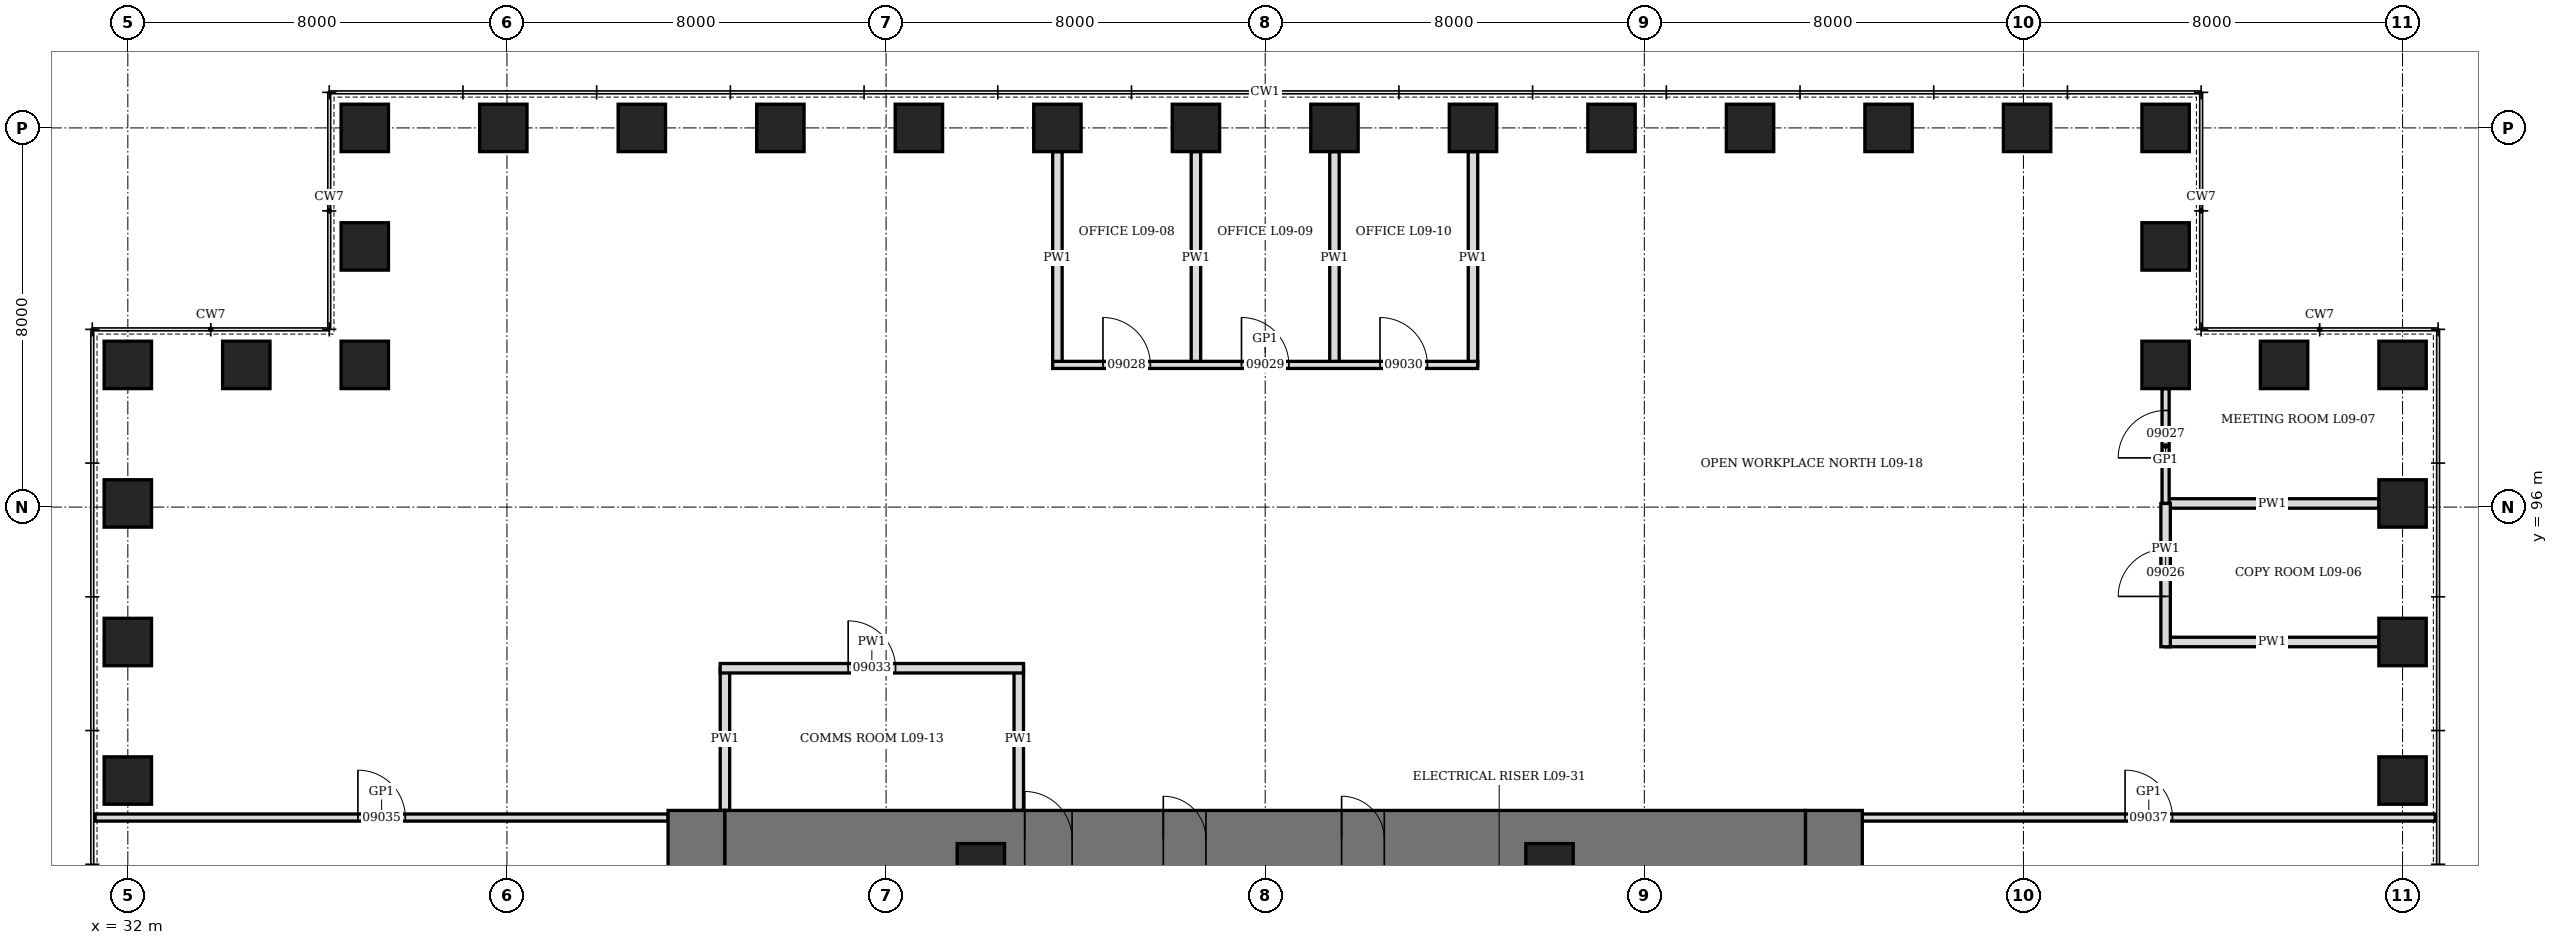
"""IFC4 building model, lengths in metres.
Left out: names, types, materials, properties, quantities, classifications, styles, units other than length and angle.
Written with IfcOpenShell. Run it as: python <this file> out.ifc"""

import sys

from ifc_helpers import new_model, si_unit, direction, frame, frame_2d, origin, origin_2d, place, context, subcontext, project, spatial, rectangle, hollow_rectangle, extrude, element, fill, save


model = new_model("IFC4")
c1 = context("Model", 3, precision=1e-05, world=origin(), true_north=direction((0.0, 1.0)))
c2 = subcontext(c1, "Body", "Model", "MODEL_VIEW")
j1 = project(units=[si_unit("LENGTHUNIT", "METRE"), si_unit("PLANEANGLEUNIT", "RADIAN")], contexts=[c1])
p1 = place(None, origin())
s1 = spatial("IfcSite", under=j1, at=p1, CompositionType="ELEMENT")
p2 = place(p1, origin())
s2 = spatial("IfcBuilding", under=s1, at=p2, CompositionType="ELEMENT")
p3 = place(p2, frame((0.0, 0.0, 47.5)))
s3 = spatial("IfcBuildingStorey", under=s2, at=p3, CompositionType="ELEMENT", Elevation=47.5)
for number, where, z_axis, x_axis in (
    (1, (80.0, 90.231, 0.0), (0.0, 0.0, 1.0), (0.0, 1.0, 0.0)),
    (2, (80.0, 93.154, 0.0), (0.0, 0.0, 1.0), (0.0, 1.0, 0.0)),
    (3, (80.0, 96.077, 0.0), (0.0, 0.0, 1.0), (0.0, 1.0, 0.0)),
    (4, (80.0, 99.0, 0.0), (0.0, 0.0, 1.0), (1.0, 0.0, 0.0)),
    (5, (77.5, 99.0, 0.0), (0.0, 0.0, 1.0), (1.0, 0.0, 0.0)),
    (6, (75.0, 99.0, 0.0), (0.0, 0.0, 1.0), (0.0, 1.0, 0.0)),
    (7, (75.0, 101.5, 0.0), (0.0, 0.0, 1.0), (0.0, 1.0, 0.0)),
    (8, (75.0, 104.0, 0.0), (0.0, 0.0, 1.0), (1.0, 0.0, 0.0)),
    (9, (72.077, 104.0, 0.0), (0.0, 0.0, 1.0), (1.0, 0.0, 0.0)),
    (10, (69.154, 104.0, 0.0), (0.0, 0.0, 1.0), (1.0, 0.0, 0.0)),
    (11, (66.231, 104.0, 0.0), (0.0, 0.0, 1.0), (1.0, 0.0, 0.0)),
    (12, (63.308, 104.0, 0.0), (0.0, 0.0, 1.0), (1.0, 0.0, 0.0)),
    (13, (60.385, 104.0, 0.0), (0.0, 0.0, 1.0), (1.0, 0.0, 0.0)),
    (14, (57.461, 104.0, 0.0), (0.0, 0.0, 1.0), (1.0, 0.0, 0.0)),
    (15, (54.539, 104.0, 0.0), (0.0, 0.0, 1.0), (1.0, 0.0, 0.0)),
    (16, (51.615, 104.0, 0.0), (0.0, 0.0, 1.0), (1.0, 0.0, 0.0)),
    (17, (48.692, 104.0, 0.0), (0.0, 0.0, 1.0), (1.0, 0.0, 0.0)),
    (18, (45.769, 104.0, 0.0), (0.0, 0.0, 1.0), (1.0, 0.0, 0.0)),
    (19, (42.846, 104.0, 0.0), (0.0, 0.0, 1.0), (1.0, 0.0, 0.0)),
    (20, (39.923, 104.0, 0.0), (0.0, 0.0, 1.0), (1.0, 0.0, 0.0)),
    (21, (37.0, 104.0, 0.0), (0.0, 0.0, 1.0), (0.0, 1.0, 0.0)),
    (22, (37.0, 101.5, 0.0), (0.0, 0.0, 1.0), (0.0, 1.0, 0.0)),
    (23, (37.0, 99.0, 0.0), (0.0, 0.0, 1.0), (1.0, 0.0, 0.0)),
    (24, (34.5, 99.0, 0.0), (0.0, 0.0, 1.0), (1.0, 0.0, 0.0)),
    (25, (32.0, 99.0, 0.0), (0.0, 0.0, 1.0), (0.0, 1.0, 0.0)),
    (26, (32.0, 96.077, 0.0), (0.0, 0.0, 1.0), (0.0, 1.0, 0.0)),
    (27, (32.0, 93.154, 0.0), (0.0, 0.0, 1.0), (0.0, 1.0, 0.0)),
    (28, (32.0, 90.231, 0.0), (0.0, 0.0, 1.0), (0.0, 1.0, 0.0)),
):
    element("IfcColumn", number, at=place(p3, frame(where, z_axis=z_axis, x_axis=x_axis)), inside=s3, PredefinedType="COLUMN", context=c2, shape_type="SweptSolid", body=[
        extrude(hollow_rectangle(XDim=1.0, YDim=1.0, WallThickness=0.25, at=origin_2d()), origin(), (0.0, 0.0, 1.0), 4.2),
    ])
p4 = place(p3, frame((44.0, 70.4, 0.0), z_axis=(0.0, 0.0, 1.0), x_axis=(0.0, 1.0, 0.0)))
e29 = element("IfcWall", 29, at=p4, inside=s3, PredefinedType="SHEAR", context=c2, shape_type="SweptSolid", body=[
    extrude(rectangle(XDim=19.2, YDim=1.2, at=frame_2d((9.6, 0.0))), origin(), (0.0, 0.0, 1.0), 4.2),
])
p5 = place(p4, frame((8.6, 0.0, 0.0)))
e30 = element("IfcOpeningElement", 30, at=p5, cuts=e29, PredefinedType="OPENING", context=c2, shape_type="SweptSolid", body=[
    extrude(rectangle(XDim=2.0, YDim=2.4, at=frame_2d((1.0, 1.2))), frame((0.0, 0.61, 0.0), z_axis=(0.0, -1.0, 0.0), x_axis=(1.0, 0.0, 0.0)), (0.0, 0.0, 1.0), 1.22),
])
p6 = place(p3, frame((68.0, 70.4, 0.0), z_axis=(0.0, 0.0, 1.0), x_axis=(0.0, 1.0, 0.0)))
e31 = element("IfcWall", 31, at=p6, inside=s3, PredefinedType="SHEAR", context=c2, shape_type="SweptSolid", body=[
    extrude(rectangle(XDim=19.2, YDim=1.2, at=frame_2d((9.6, 0.0))), origin(), (0.0, 0.0, 1.0), 4.2),
])
p7 = place(p6, frame((8.6, 0.0, 0.0)))
e32 = element("IfcOpeningElement", 32, at=p7, cuts=e31, PredefinedType="OPENING", context=c2, shape_type="SweptSolid", body=[
    extrude(rectangle(XDim=2.0, YDim=2.4, at=frame_2d((1.0, 1.2))), frame((0.0, 0.61, 0.0), z_axis=(0.0, -1.0, 0.0), x_axis=(1.0, 0.0, 0.0)), (0.0, 0.0, 1.0), 1.22),
])
p8 = place(p3, frame((44.6, 89.0, 0.0), z_axis=(0.0, 0.0, 1.0), x_axis=(1.0, 0.0, 0.0)))
e33 = element("IfcWall", 33, at=p8, inside=s3, PredefinedType="SHEAR", context=c2, shape_type="SweptSolid", body=[
    extrude(rectangle(XDim=22.8, YDim=1.2, at=frame_2d((11.4, 0.0))), origin(), (0.0, 0.0, 1.0), 4.2),
])
p9 = place(p8, frame((6.325, 0.0, 0.0)))
e34 = element("IfcOpeningElement", 34, at=p9, cuts=e33, PredefinedType="OPENING", context=c2, shape_type="SweptSolid", body=[
    extrude(rectangle(XDim=1.0, YDim=2.1, at=frame_2d((0.5, 1.05))), frame((0.0, 0.61, 0.0), z_axis=(0.0, -1.0, 0.0), x_axis=(1.0, 0.0, 0.0)), (0.0, 0.0, 1.0), 1.22),
])
p10 = place(p8, frame((9.25, 0.0, 0.0)))
e35 = element("IfcOpeningElement", 35, at=p10, cuts=e33, PredefinedType="OPENING", context=c2, shape_type="SweptSolid", body=[
    extrude(rectangle(XDim=0.9, YDim=2.1, at=frame_2d((0.45, 1.05))), frame((0.0, 0.61, 0.0), z_axis=(0.0, -1.0, 0.0), x_axis=(1.0, 0.0, 0.0)), (0.0, 0.0, 1.0), 1.22),
])
p11 = place(p8, frame((13.012, 0.0, 0.0)))
e36 = element("IfcOpeningElement", 36, at=p11, cuts=e33, PredefinedType="OPENING", context=c2, shape_type="SweptSolid", body=[
    extrude(rectangle(XDim=0.9, YDim=2.1, at=frame_2d((0.45, 1.05))), frame((0.0, 0.61, 0.0), z_axis=(0.0, -1.0, 0.0), x_axis=(1.0, 0.0, 0.0)), (0.0, 0.0, 1.0), 1.22),
])
for number, where, z_axis, x_axis in (
    (37, (50.0, 88.4, 0.0), (0.0, 0.0, 1.0), (1.0, 0.0, 0.0)),
    (38, (62.0, 88.4, 0.0), (0.0, 0.0, 1.0), (1.0, 0.0, 0.0)),
):
    element("IfcColumn", number, at=place(p3, frame(where, z_axis=z_axis, x_axis=x_axis)), inside=s3, PredefinedType="COLUMN", context=c2, shape_type="SweptSolid", body=[
        extrude(hollow_rectangle(XDim=1.0, YDim=1.0, WallThickness=0.15, at=origin_2d()), origin(), (0.0, 0.0, 1.0), 4.2),
    ])
for number, where, z_axis, x_axis in (
    (39, (75.0, 93.154, 0.0), (0.0, 0.0, 1.0), (1.0, 0.0, 0.0)),
    (40, (75.0, 96.077, 0.0), (0.0, 0.0, 1.0), (1.0, 0.0, 0.0)),
):
    element("IfcWall", number, at=place(p3, frame(where, z_axis=z_axis, x_axis=x_axis)), inside=s3, PredefinedType="PARTITIONING", context=c2, shape_type="SweptSolid", body=[
        extrude(rectangle(XDim=4.5, YDim=0.2, at=frame_2d((2.25, 0.0))), origin(), (0.0, 0.0, 1.0), 3.428),
    ])
for number, where, z_axis, x_axis in (
    (41, (51.615, 99.0, 0.0), (0.0, 0.0, 1.0), (0.0, 1.0, 0.0)),
    (42, (54.539, 99.0, 0.0), (0.0, 0.0, 1.0), (0.0, 1.0, 0.0)),
    (43, (57.461, 99.0, 0.0), (0.0, 0.0, 1.0), (0.0, 1.0, 0.0)),
    (44, (60.385, 99.0, 0.0), (0.0, 0.0, 1.0), (0.0, 1.0, 0.0)),
):
    element("IfcWall", number, at=place(p3, frame(where, z_axis=z_axis, x_axis=x_axis)), inside=s3, PredefinedType="PARTITIONING", context=c2, shape_type="SweptSolid", body=[
        extrude(rectangle(XDim=4.5, YDim=0.2, at=frame_2d((2.25, 0.0))), origin(), (0.0, 0.0, 1.0), 3.278),
    ])
for number, where, z_axis, x_axis in (
    (45, (44.6, 89.6, 0.0), (0.0, 0.0, 1.0), (0.0, 1.0, 0.0)),
    (46, (50.8, 89.6, 0.0), (0.0, 0.0, 1.0), (0.0, 1.0, 0.0)),
):
    element("IfcWall", number, at=place(p3, frame(where, z_axis=z_axis, x_axis=x_axis)), inside=s3, PredefinedType="PARTITIONING", context=c2, shape_type="SweptSolid", body=[
        extrude(rectangle(XDim=3.0, YDim=0.2, at=frame_2d((1.5, 0.0))), origin(), (0.0, 0.0, 1.0), 4.04),
    ])
p12 = place(p3, frame((31.31, 89.45, 0.0), z_axis=(0.0, 0.0, 1.0), x_axis=(1.0, 0.0, 0.0)))
e47 = element("IfcWall", 47, at=p12, inside=s3, PredefinedType="PARTITIONING", context=c2, shape_type="SweptSolid", body=[
    extrude(rectangle(XDim=12.09, YDim=0.15, at=frame_2d((6.045, 0.0))), origin(), (0.0, 0.0, 1.0), 4.04),
])
p13 = place(p12, frame((5.545, 0.0, 0.0)))
e48 = element("IfcOpeningElement", 48, at=p13, cuts=e47, PredefinedType="OPENING", context=c2, shape_type="SweptSolid", body=[
    extrude(rectangle(XDim=1.0, YDim=2.4, at=frame_2d((0.5, 1.2))), frame((0.0, 0.085, 0.0), z_axis=(0.0, -1.0, 0.0), x_axis=(1.0, 0.0, 0.0)), (0.0, 0.0, 1.0), 0.17),
])
p14 = place(p3, frame((68.6, 89.45, 0.0), z_axis=(0.0, 0.0, 1.0), x_axis=(1.0, 0.0, 0.0)))
e49 = element("IfcWall", 49, at=p14, inside=s3, PredefinedType="PARTITIONING", context=c2, shape_type="SweptSolid", body=[
    extrude(rectangle(XDim=12.09, YDim=0.15, at=frame_2d((6.045, 0.0))), origin(), (0.0, 0.0, 1.0), 4.04),
])
p15 = place(p14, frame((5.545, 0.0, 0.0)))
e50 = element("IfcOpeningElement", 50, at=p15, cuts=e49, PredefinedType="OPENING", context=c2, shape_type="SweptSolid", body=[
    extrude(rectangle(XDim=1.0, YDim=2.4, at=frame_2d((0.5, 1.2))), frame((0.0, 0.085, 0.0), z_axis=(0.0, -1.0, 0.0), x_axis=(1.0, 0.0, 0.0)), (0.0, 0.0, 1.0), 0.17),
])
p16 = place(p3, frame((44.5, 92.6, 0.0), z_axis=(0.0, 0.0, 1.0), x_axis=(1.0, 0.0, 0.0)))
e51 = element("IfcWall", 51, at=p16, inside=s3, PredefinedType="PARTITIONING", context=c2, shape_type="SweptSolid", body=[
    extrude(rectangle(XDim=6.4, YDim=0.2, at=frame_2d((3.2, 0.0))), origin(), (0.0, 0.0, 1.0), 4.04),
])
p17 = place(p16, frame((2.7, 0.0, 0.0)))
e52 = element("IfcOpeningElement", 52, at=p17, cuts=e51, PredefinedType="OPENING", context=c2, shape_type="SweptSolid", body=[
    extrude(rectangle(XDim=1.0, YDim=2.1, at=frame_2d((0.5, 1.05))), frame((0.0, 0.11, 0.0), z_axis=(0.0, -1.0, 0.0), x_axis=(1.0, 0.0, 0.0)), (0.0, 0.0, 1.0), 0.22),
])
p18 = place(p3, frame((51.515, 99.0, 0.0), z_axis=(0.0, 0.0, 1.0), x_axis=(1.0, 0.0, 0.0)))
e53 = element("IfcWall", 53, at=p18, inside=s3, PredefinedType="PARTITIONING", context=c2, shape_type="SweptSolid", body=[
    extrude(rectangle(XDim=8.969, YDim=0.15, at=frame_2d((4.485, 0.0))), origin(), (0.0, 0.0, 1.0), 4.04),
])
p19 = place(p18, frame((1.062, 0.0, 0.0)))
e54 = element("IfcOpeningElement", 54, at=p19, cuts=e53, PredefinedType="OPENING", context=c2, shape_type="SweptSolid", body=[
    extrude(rectangle(XDim=1.0, YDim=2.1, at=frame_2d((0.5, 1.05))), frame((0.0, 0.085, 0.0), z_axis=(0.0, -1.0, 0.0), x_axis=(1.0, 0.0, 0.0)), (0.0, 0.0, 1.0), 0.17),
])
p20 = place(p18, frame((3.985, 0.0, 0.0)))
e55 = element("IfcOpeningElement", 55, at=p20, cuts=e53, PredefinedType="OPENING", context=c2, shape_type="SweptSolid", body=[
    extrude(rectangle(XDim=1.0, YDim=2.1, at=frame_2d((0.5, 1.05))), frame((0.0, 0.085, 0.0), z_axis=(0.0, -1.0, 0.0), x_axis=(1.0, 0.0, 0.0)), (0.0, 0.0, 1.0), 0.17),
])
p21 = place(p18, frame((6.908, 0.0, 0.0)))
e56 = element("IfcOpeningElement", 56, at=p21, cuts=e53, PredefinedType="OPENING", context=c2, shape_type="SweptSolid", body=[
    extrude(rectangle(XDim=1.0, YDim=2.1, at=frame_2d((0.5, 1.05))), frame((0.0, 0.085, 0.0), z_axis=(0.0, -1.0, 0.0), x_axis=(1.0, 0.0, 0.0)), (0.0, 0.0, 1.0), 0.17),
])
p22 = place(p3, frame((75.0, 96.077, 0.0), z_axis=(0.0, 0.0, 1.0), x_axis=(0.0, 1.0, 0.0)))
e57 = element("IfcWall", 57, at=p22, inside=s3, PredefinedType="PARTITIONING", context=c2, shape_type="SweptSolid", body=[
    extrude(rectangle(XDim=2.423, YDim=0.15, at=frame_2d((1.211, 0.0))), origin(), (0.0, 0.0, 1.0), 4.04),
])
p23 = place(p22, frame((0.961, 0.0, 0.0)))
e58 = element("IfcOpeningElement", 58, at=p23, cuts=e57, PredefinedType="OPENING", context=c2, shape_type="SweptSolid", body=[
    extrude(rectangle(XDim=1.0, YDim=2.4, at=frame_2d((0.5, 1.2))), frame((0.0, 0.085, 0.0), z_axis=(0.0, -1.0, 0.0), x_axis=(1.0, 0.0, 0.0)), (0.0, 0.0, 1.0), 0.17),
])
p24 = place(p3, frame((75.0, 93.054, 0.0), z_axis=(0.0, 0.0, 1.0), x_axis=(0.0, 1.0, 0.0)))
e59 = element("IfcWall", 59, at=p24, inside=s3, PredefinedType="PARTITIONING", context=c2, shape_type="SweptSolid", body=[
    extrude(rectangle(XDim=3.023, YDim=0.2, at=frame_2d((1.511, 0.0))), origin(), (0.0, 0.0, 1.0), 4.04),
])
p25 = place(p24, frame((1.062, 0.0, 0.0)))
e60 = element("IfcOpeningElement", 60, at=p25, cuts=e59, PredefinedType="OPENING", context=c2, shape_type="SweptSolid", body=[
    extrude(rectangle(XDim=1.0, YDim=2.1, at=frame_2d((0.5, 1.05))), frame((0.0, 0.11, 0.0), z_axis=(0.0, -1.0, 0.0), x_axis=(1.0, 0.0, 0.0)), (0.0, 0.0, 1.0), 0.22),
])
p26 = place(p9, origin())
e61 = element("IfcDoor", 61, at=p26, inside=s3, OperationType="SINGLE_SWING_LEFT", PredefinedType="DOOR", context=c2, shape_type="SweptSolid", body=[
    extrude(rectangle(XDim=1.0, YDim=2.1, at=frame_2d((0.5, 1.05))), frame((0.0, 0.35, 0.0), z_axis=(0.0, -1.0, 0.0), x_axis=(1.0, 0.0, 0.0)), (0.0, 0.0, 1.0), 0.7),
])
fill(e34, e61)
p27 = place(p10, origin())
e62 = element("IfcDoor", 62, at=p27, inside=s3, OperationType="SINGLE_SWING_LEFT", PredefinedType="DOOR", context=c2, shape_type="SweptSolid", body=[
    extrude(rectangle(XDim=0.9, YDim=2.1, at=frame_2d((0.45, 1.05))), frame((0.0, 0.35, 0.0), z_axis=(0.0, -1.0, 0.0), x_axis=(1.0, 0.0, 0.0)), (0.0, 0.0, 1.0), 0.7),
])
fill(e35, e62)
p28 = place(p11, origin())
e63 = element("IfcDoor", 63, at=p28, inside=s3, OperationType="SINGLE_SWING_LEFT", PredefinedType="DOOR", context=c2, shape_type="SweptSolid", body=[
    extrude(rectangle(XDim=0.9, YDim=2.1, at=frame_2d((0.45, 1.05))), frame((0.0, 0.35, 0.0), z_axis=(0.0, -1.0, 0.0), x_axis=(1.0, 0.0, 0.0)), (0.0, 0.0, 1.0), 0.7),
])
fill(e36, e63)
p29 = place(p25, origin())
e64 = element("IfcDoor", 64, at=p29, inside=s3, OperationType="SINGLE_SWING_LEFT", PredefinedType="DOOR", context=c2, shape_type="SweptSolid", body=[
    extrude(rectangle(XDim=1.0, YDim=2.1, at=frame_2d((0.5, 1.05))), frame((0.0, 0.1, 0.0), z_axis=(0.0, -1.0, 0.0), x_axis=(1.0, 0.0, 0.0)), (0.0, 0.0, 1.0), 0.199),
])
fill(e60, e64)
p30 = place(p23, origin())
e65 = element("IfcDoor", 65, at=p30, inside=s3, OperationType="SINGLE_SWING_RIGHT", PredefinedType="DOOR", context=c2, shape_type="SweptSolid", body=[
    extrude(rectangle(XDim=1.0, YDim=2.4, at=frame_2d((0.5, 1.2))), frame((0.0, 0.075, 0.0), z_axis=(0.0, -1.0, 0.0), x_axis=(1.0, 0.0, 0.0)), (0.0, 0.0, 1.0), 0.149),
])
fill(e58, e65)
p31 = place(p19, origin())
e66 = element("IfcDoor", 66, at=p31, inside=s3, OperationType="SINGLE_SWING_LEFT", PredefinedType="DOOR", context=c2, shape_type="SweptSolid", body=[
    extrude(rectangle(XDim=1.0, YDim=2.1, at=frame_2d((0.5, 1.05))), frame((0.0, 0.075, 0.0), z_axis=(0.0, -1.0, 0.0), x_axis=(1.0, 0.0, 0.0)), (0.0, 0.0, 1.0), 0.149),
])
fill(e54, e66)
p32 = place(p20, origin())
e67 = element("IfcDoor", 67, at=p32, inside=s3, OperationType="SINGLE_SWING_LEFT", PredefinedType="DOOR", context=c2, shape_type="SweptSolid", body=[
    extrude(rectangle(XDim=1.0, YDim=2.1, at=frame_2d((0.5, 1.05))), frame((0.0, 0.075, 0.0), z_axis=(0.0, -1.0, 0.0), x_axis=(1.0, 0.0, 0.0)), (0.0, 0.0, 1.0), 0.149),
])
fill(e55, e67)
p33 = place(p21, origin())
e68 = element("IfcDoor", 68, at=p33, inside=s3, OperationType="SINGLE_SWING_LEFT", PredefinedType="DOOR", context=c2, shape_type="SweptSolid", body=[
    extrude(rectangle(XDim=1.0, YDim=2.1, at=frame_2d((0.5, 1.05))), frame((0.0, 0.075, 0.0), z_axis=(0.0, -1.0, 0.0), x_axis=(1.0, 0.0, 0.0)), (0.0, 0.0, 1.0), 0.149),
])
fill(e56, e68)
p34 = place(p17, origin())
e69 = element("IfcDoor", 69, at=p34, inside=s3, OperationType="SINGLE_SWING_LEFT", PredefinedType="DOOR", context=c2, shape_type="SweptSolid", body=[
    extrude(rectangle(XDim=1.0, YDim=2.1, at=frame_2d((0.5, 1.05))), frame((0.0, 0.1, 0.0), z_axis=(0.0, -1.0, 0.0), x_axis=(1.0, 0.0, 0.0)), (0.0, 0.0, 1.0), 0.199),
])
fill(e52, e69)
p35 = place(p13, origin())
e70 = element("IfcDoor", 70, at=p35, inside=s3, OperationType="SINGLE_SWING_RIGHT", PredefinedType="DOOR", context=c2, shape_type="SweptSolid", body=[
    extrude(rectangle(XDim=1.0, YDim=2.4, at=frame_2d((0.5, 1.2))), frame((0.0, 0.075, 0.0), z_axis=(0.0, -1.0, 0.0), x_axis=(1.0, 0.0, 0.0)), (0.0, 0.0, 1.0), 0.149),
])
fill(e48, e70)
p36 = place(p15, origin())
e71 = element("IfcDoor", 71, at=p36, inside=s3, OperationType="SINGLE_SWING_RIGHT", PredefinedType="DOOR", context=c2, shape_type="SweptSolid", body=[
    extrude(rectangle(XDim=1.0, YDim=2.4, at=frame_2d((0.5, 1.2))), frame((0.0, 0.075, 0.0), z_axis=(0.0, -1.0, 0.0), x_axis=(1.0, 0.0, 0.0)), (0.0, 0.0, 1.0), 0.149),
])
fill(e50, e71)
save(model, sys.argv[1])
